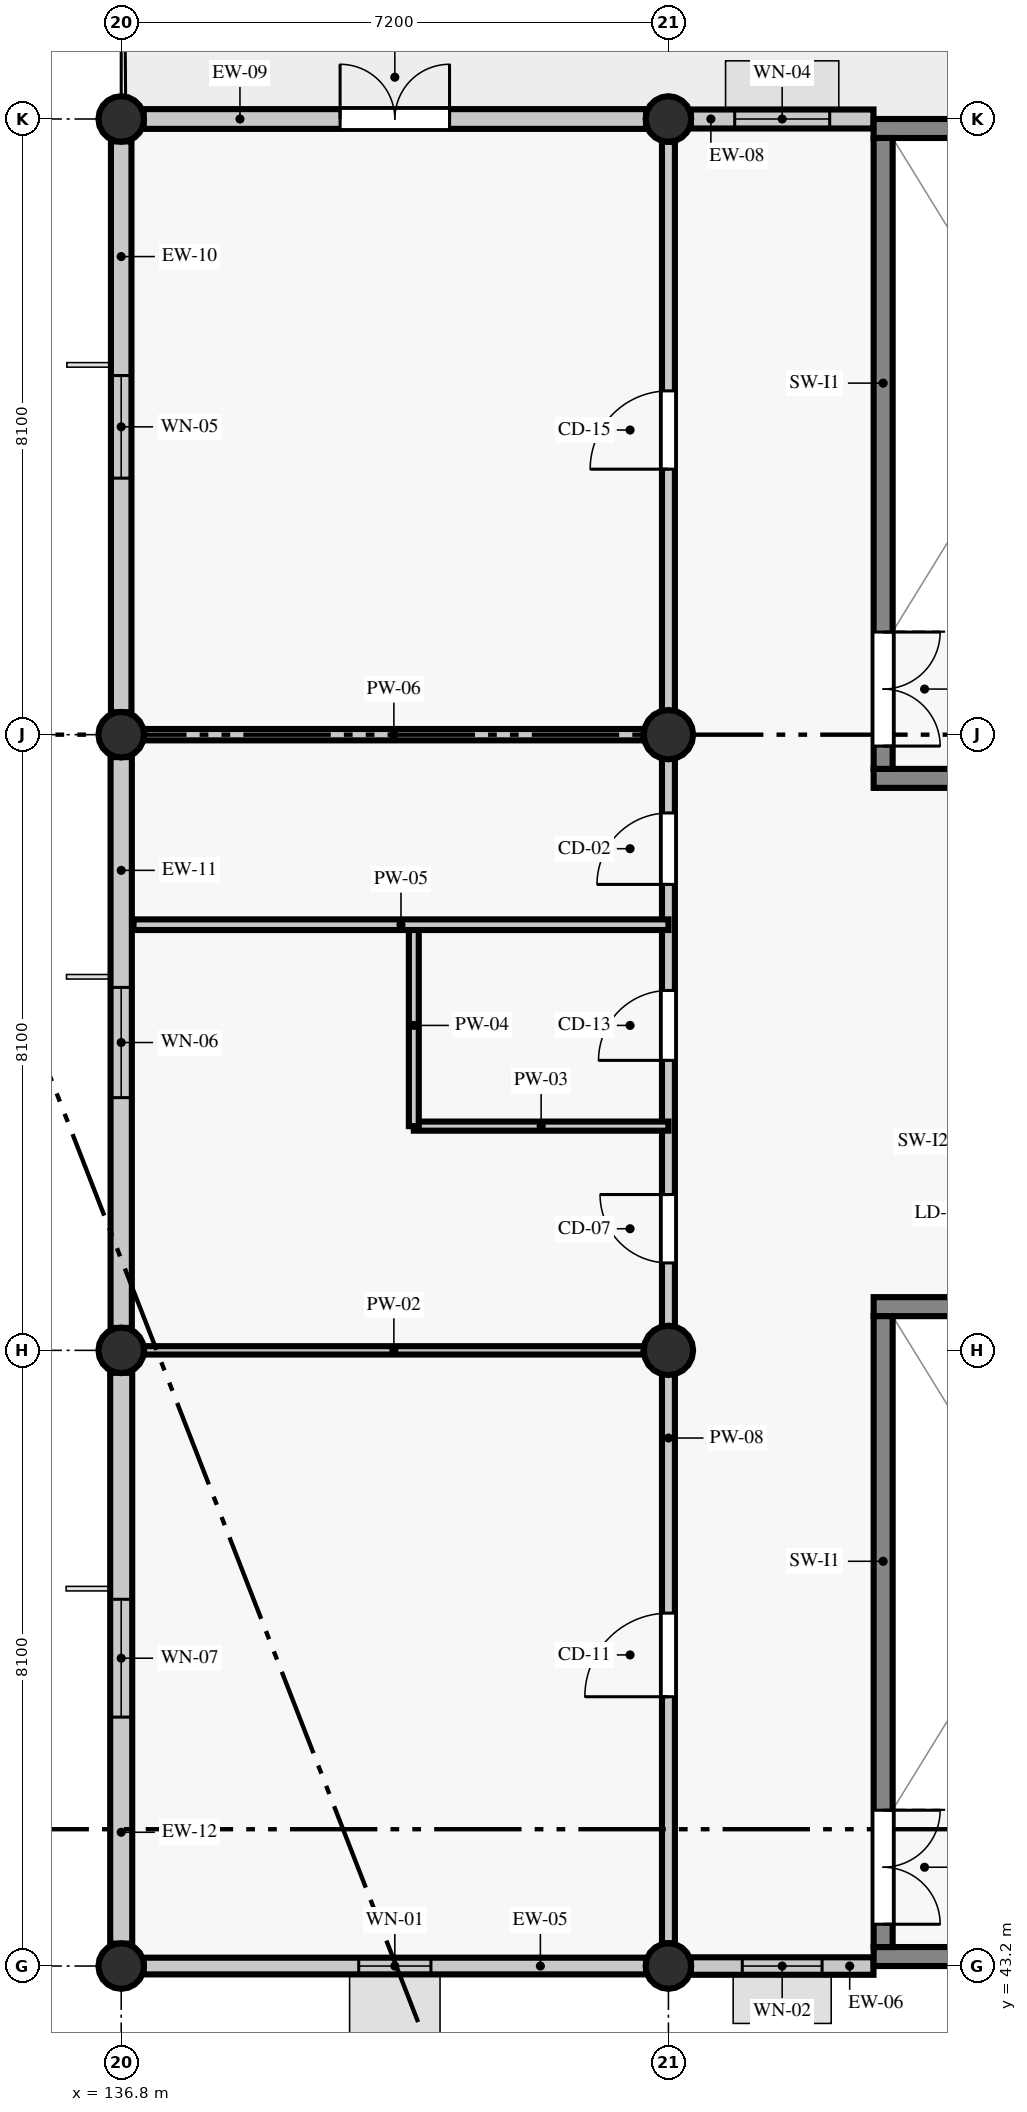
"""IFC4 building model, lengths in metres.
Left out: names, types, materials, properties, quantities, classifications, styles, units other than length and angle.
Written with IfcOpenShell. Run it as: python <this file> out.ifc"""

import sys

from ifc_helpers import new_model, si_unit, direction, frame, frame_2d, origin, origin_2d, place, context, subcontext, project, spatial, rectangle, circle, extrude, element, fill, save


model = new_model("IFC4")
c1 = context("Model", 3, precision=1e-05, world=origin(), true_north=direction((0.0, 1.0)))
c2 = subcontext(c1, "Body", "Model", "MODEL_VIEW")
j1 = project(units=[si_unit("LENGTHUNIT", "METRE"), si_unit("PLANEANGLEUNIT", "RADIAN")], contexts=[c1])
p1 = place(None, origin())
s1 = spatial("IfcSite", under=j1, at=p1, CompositionType="ELEMENT")
p2 = place(p1, origin())
s2 = spatial("IfcBuilding", under=s1, at=p2, CompositionType="ELEMENT")
p3 = place(p2, frame((0.0, 0.0, 9.6)))
s3 = spatial("IfcBuildingStorey", under=s2, at=p3, CompositionType="ELEMENT", Elevation=9.6)
for number, where, z_axis, x_axis in (
    (1, (136.8, 43.2, 0.0), (0.0, 0.0, 1.0), (1.0, 0.0, 0.0)),
    (2, (136.8, 51.3, 0.0), (0.0, 0.0, 1.0), (1.0, 0.0, 0.0)),
    (3, (136.8, 59.4, 0.0), (0.0, 0.0, 1.0), (1.0, 0.0, 0.0)),
    (4, (136.8, 67.5, 0.0), (0.0, 0.0, 1.0), (1.0, 0.0, 0.0)),
    (5, (144.0, 43.2, 0.0), (0.0, 0.0, 1.0), (1.0, 0.0, 0.0)),
):
    element("IfcColumn", number, at=place(p3, frame(where, z_axis=z_axis, x_axis=x_axis)), inside=s3, PredefinedType="COLUMN", context=c2, shape_type="SweptSolid", body=[
        extrude(circle(Radius=0.3, at=origin_2d()), origin(), (0.0, 0.0, 1.0), 4.2),
    ])
for number, where, z_axis, x_axis in (
    (6, (144.0, 51.3, 0.0), (0.0, 0.0, 1.0), (1.0, 0.0, 0.0)),
    (7, (144.0, 59.4, 0.0), (0.0, 0.0, 1.0), (1.0, 0.0, 0.0)),
):
    element("IfcColumn", number, at=place(p3, frame(where, z_axis=z_axis, x_axis=x_axis)), inside=s3, PredefinedType="COLUMN", context=c2, shape_type="SweptSolid", body=[
        extrude(circle(Radius=0.325, at=origin_2d()), origin(), (0.0, 0.0, 1.0), 4.2),
    ])
p4 = place(p3, frame((144.0, 67.5, 0.0), z_axis=(0.0, 0.0, 1.0), x_axis=(1.0, 0.0, 0.0)))
e8 = element("IfcColumn", 8, at=p4, inside=s3, PredefinedType="COLUMN", context=c2, shape_type="SweptSolid", body=[
    extrude(circle(Radius=0.3, at=origin_2d()), origin(), (0.0, 0.0, 1.0), 4.2),
])
p5 = place(p3, frame((137.095, 43.2, 0.0), z_axis=(0.0, 0.0, 1.0), x_axis=(1.0, 0.0, 0.0)))
e9 = element("IfcWall", 9, at=p5, inside=s3, PredefinedType="STANDARD", context=c2, shape_type="SweptSolid", body=[
    extrude(rectangle(XDim=6.61, YDim=0.22, at=frame_2d((3.305, 0.0))), origin(), (0.0, 0.0, 1.0), 3.55),
])
p6 = place(p5, frame((2.83, 0.0, 0.9)))
e10 = element("IfcOpeningElement", 10, at=p6, cuts=e9, PredefinedType="OPENING", context=c2, shape_type="SweptSolid", body=[
    extrude(rectangle(XDim=0.95, YDim=1.3, at=frame_2d((0.475, 0.65))), frame((0.0, 0.12, 0.0), z_axis=(0.0, -1.0, 0.0), x_axis=(1.0, 0.0, 0.0)), (0.0, 0.0, 1.0), 0.24),
])
p7 = place(p3, frame((144.295, 43.2, 0.0), z_axis=(0.0, 0.0, 1.0), x_axis=(1.0, 0.0, 0.0)))
e11 = element("IfcWall", 11, at=p7, inside=s3, PredefinedType="STANDARD", context=c2, shape_type="SweptSolid", body=[
    extrude(rectangle(XDim=2.403, YDim=0.23, at=frame_2d((1.202, 0.0))), origin(), (0.0, 0.0, 1.0), 4.2),
])
p8 = place(p7, frame((0.677, 0.0, 0.9)))
e12 = element("IfcOpeningElement", 12, at=p8, cuts=e11, PredefinedType="OPENING", context=c2, shape_type="SweptSolid", body=[
    extrude(rectangle(XDim=1.05, YDim=1.3, at=frame_2d((0.525, 0.65))), frame((0.0, 0.125, 0.0), z_axis=(0.0, -1.0, 0.0), x_axis=(1.0, 0.0, 0.0)), (0.0, 0.0, 1.0), 0.25),
])
p9 = place(p3, frame((146.698, 67.5, 0.0), z_axis=(0.0, 0.0, 1.0), x_axis=(-1.0, 0.0, 0.0)))
e13 = element("IfcWall", 13, at=p9, inside=s3, PredefinedType="STANDARD", context=c2, shape_type="SweptSolid", body=[
    extrude(rectangle(XDim=2.403, YDim=0.25, at=frame_2d((1.202, 0.0))), origin(), (0.0, 0.0, 1.0), 4.2),
])
p10 = place(p9, frame((0.576, 0.0, 0.9)))
e14 = element("IfcOpeningElement", 14, at=p10, cuts=e13, PredefinedType="OPENING", context=c2, shape_type="SweptSolid", body=[
    extrude(rectangle(XDim=1.25, YDim=1.3, at=frame_2d((0.625, 0.65))), frame((0.0, 0.135, 0.0), z_axis=(0.0, -1.0, 0.0), x_axis=(1.0, 0.0, 0.0)), (0.0, 0.0, 1.0), 0.27),
])
p11 = place(p3, frame((143.705, 67.5, 0.0), z_axis=(0.0, 0.0, 1.0), x_axis=(-1.0, 0.0, 0.0)))
e15 = element("IfcWall", 15, at=p11, inside=s3, PredefinedType="STANDARD", context=c2, shape_type="SweptSolid", body=[
    extrude(rectangle(XDim=6.61, YDim=0.26, at=frame_2d((3.305, 0.0))), origin(), (0.0, 0.0, 1.0), 3.55),
])
p12 = place(p11, frame((2.585, 0.0, 0.0)))
e16 = element("IfcOpeningElement", 16, at=p12, cuts=e15, PredefinedType="OPENING", context=c2, shape_type="SweptSolid", body=[
    extrude(rectangle(XDim=1.44, YDim=2.16, at=frame_2d((0.72, 1.08))), frame((0.0, 0.14, 0.0), z_axis=(0.0, -1.0, 0.0), x_axis=(1.0, 0.0, 0.0)), (0.0, 0.0, 1.0), 0.28),
])
p13 = place(p3, frame((136.8, 67.205, 0.0), z_axis=(0.0, 0.0, 1.0), x_axis=(0.0, -1.0, 0.0)))
e17 = element("IfcWall", 17, at=p13, inside=s3, PredefinedType="STANDARD", context=c2, shape_type="SweptSolid", body=[
    extrude(rectangle(XDim=7.51, YDim=0.27, at=frame_2d((3.755, 0.0))), origin(), (0.0, 0.0, 1.0), 3.55),
])
p14 = place(p13, frame((3.08, 0.0, 0.9)))
e18 = element("IfcOpeningElement", 18, at=p14, cuts=e17, PredefinedType="OPENING", context=c2, shape_type="SweptSolid", body=[
    extrude(rectangle(XDim=1.35, YDim=1.3, at=frame_2d((0.675, 0.65))), frame((0.0, 0.145, 0.0), z_axis=(0.0, -1.0, 0.0), x_axis=(1.0, 0.0, 0.0)), (0.0, 0.0, 1.0), 0.29),
])
p15 = place(p3, frame((136.8, 59.105, 0.0), z_axis=(0.0, 0.0, 1.0), x_axis=(0.0, -1.0, 0.0)))
e19 = element("IfcWall", 19, at=p15, inside=s3, PredefinedType="STANDARD", context=c2, shape_type="SweptSolid", body=[
    extrude(rectangle(XDim=7.51, YDim=0.28, at=frame_2d((3.755, 0.0))), origin(), (0.0, 0.0, 1.0), 3.55),
])
p16 = place(p15, frame((3.03, 0.0, 0.9)))
e20 = element("IfcOpeningElement", 20, at=p16, cuts=e19, PredefinedType="OPENING", context=c2, shape_type="SweptSolid", body=[
    extrude(rectangle(XDim=1.45, YDim=1.3, at=frame_2d((0.725, 0.65))), frame((0.0, 0.15, 0.0), z_axis=(0.0, -1.0, 0.0), x_axis=(1.0, 0.0, 0.0)), (0.0, 0.0, 1.0), 0.3),
])
p17 = place(p3, frame((136.8, 51.005, 0.0), z_axis=(0.0, 0.0, 1.0), x_axis=(0.0, -1.0, 0.0)))
e21 = element("IfcWall", 21, at=p17, inside=s3, PredefinedType="STANDARD", context=c2, shape_type="SweptSolid", body=[
    extrude(rectangle(XDim=7.51, YDim=0.29, at=frame_2d((3.755, 0.0))), origin(), (0.0, 0.0, 1.0), 3.55),
])
p18 = place(p17, frame((2.98, 0.0, 0.9)))
e22 = element("IfcOpeningElement", 22, at=p18, cuts=e21, PredefinedType="OPENING", context=c2, shape_type="SweptSolid", body=[
    extrude(rectangle(XDim=1.55, YDim=1.3, at=frame_2d((0.775, 0.65))), frame((0.0, 0.155, 0.0), z_axis=(0.0, -1.0, 0.0), x_axis=(1.0, 0.0, 0.0)), (0.0, 0.0, 1.0), 0.31),
])
for number, where, z_axis, x_axis in (
    (23, (146.7, 43.325, 0.0), (0.0, 0.0, 1.0), (1.0, 0.0, 0.0)),
    (24, (151.2, 51.875, 0.0), (0.0, 0.0, 1.0), (-1.0, 0.0, 0.0)),
):
    element("IfcWall", number, at=place(p3, frame(where, z_axis=z_axis, x_axis=x_axis)), inside=s3, PredefinedType="SHEAR", context=c2, shape_type="SweptSolid", body=[
        extrude(rectangle(XDim=4.5, YDim=0.25, at=frame_2d((2.25, 0.0))), origin(), (0.0, 0.0, 1.0), 4.2),
    ])
p19 = place(p3, frame((146.825, 51.75, 0.0), z_axis=(0.0, 0.0, 1.0), x_axis=(0.0, -1.0, 0.0)))
e25 = element("IfcWall", 25, at=p19, inside=s3, PredefinedType="SHEAR", context=c2, shape_type="SweptSolid", body=[
    extrude(rectangle(XDim=8.3, YDim=0.25, at=frame_2d((4.15, 0.0))), origin(), (0.0, 0.0, 1.0), 4.2),
])
p20 = place(p19, frame((6.5, 0.0, 0.0)))
e26 = element("IfcOpeningElement", 26, at=p20, cuts=e25, PredefinedType="OPENING", context=c2, shape_type="SweptSolid", body=[
    extrude(rectangle(XDim=1.5, YDim=2.15, at=frame_2d((0.75, 1.075))), frame((0.0, 0.135, 0.0), z_axis=(0.0, -1.0, 0.0), x_axis=(1.0, 0.0, 0.0)), (0.0, 0.0, 1.0), 0.27),
])
for number, where, z_axis, x_axis in (
    (27, (146.7, 58.825, 0.0), (0.0, 0.0, 1.0), (1.0, 0.0, 0.0)),
    (28, (151.2, 67.375, 0.0), (0.0, 0.0, 1.0), (-1.0, 0.0, 0.0)),
):
    element("IfcWall", number, at=place(p3, frame(where, z_axis=z_axis, x_axis=x_axis)), inside=s3, PredefinedType="SHEAR", context=c2, shape_type="SweptSolid", body=[
        extrude(rectangle(XDim=4.5, YDim=0.25, at=frame_2d((2.25, 0.0))), origin(), (0.0, 0.0, 1.0), 4.2),
    ])
p21 = place(p3, frame((146.825, 67.25, 0.0), z_axis=(0.0, 0.0, 1.0), x_axis=(0.0, -1.0, 0.0)))
e29 = element("IfcWall", 29, at=p21, inside=s3, PredefinedType="SHEAR", context=c2, shape_type="SweptSolid", body=[
    extrude(rectangle(XDim=8.3, YDim=0.25, at=frame_2d((4.15, 0.0))), origin(), (0.0, 0.0, 1.0), 4.2),
])
p22 = place(p21, frame((6.5, 0.0, 0.0)))
e30 = element("IfcOpeningElement", 30, at=p22, cuts=e29, PredefinedType="OPENING", context=c2, shape_type="SweptSolid", body=[
    extrude(rectangle(XDim=1.5, YDim=2.15, at=frame_2d((0.75, 1.075))), frame((0.0, 0.135, 0.0), z_axis=(0.0, -1.0, 0.0), x_axis=(1.0, 0.0, 0.0)), (0.0, 0.0, 1.0), 0.27),
])
p23 = place(p3, frame((144.0, 43.5, 0.0), z_axis=(0.0, 0.0, 1.0), x_axis=(0.0, 1.0, 0.0)))
e31 = element("IfcWall", 31, at=p23, inside=s3, PredefinedType="PARTITIONING", context=c2, shape_type="SweptSolid", body=[
    extrude(rectangle(XDim=23.7, YDim=0.17, at=frame_2d((11.85, 0.0))), origin(), (0.0, 0.0, 1.0), 3.75),
])
p24 = place(p23, frame((3.243, 0.0, 0.0)))
e32 = element("IfcOpeningElement", 32, at=p24, cuts=e31, PredefinedType="OPENING", context=c2, shape_type="SweptSolid", body=[
    extrude(rectangle(XDim=1.1, YDim=2.13, at=frame_2d((0.55, 1.065))), frame((0.0, 0.095, 0.0), z_axis=(0.0, -1.0, 0.0), x_axis=(1.0, 0.0, 0.0)), (0.0, 0.0, 1.0), 0.19),
])
p25 = place(p23, frame((8.95, 0.0, 0.0)))
e33 = element("IfcOpeningElement", 33, at=p25, cuts=e31, PredefinedType="OPENING", context=c2, shape_type="SweptSolid", body=[
    extrude(rectangle(XDim=0.9, YDim=2.13, at=frame_2d((0.45, 1.065))), frame((0.0, 0.095, 0.0), z_axis=(0.0, -1.0, 0.0), x_axis=(1.0, 0.0, 0.0)), (0.0, 0.0, 1.0), 0.19),
])
p26 = place(p23, frame((11.615, 0.0, 0.0)))
e34 = element("IfcOpeningElement", 34, at=p26, cuts=e31, PredefinedType="OPENING", context=c2, shape_type="SweptSolid", body=[
    extrude(rectangle(XDim=0.92, YDim=2.18, at=frame_2d((0.46, 1.09))), frame((0.0, 0.095, 0.0), z_axis=(0.0, -1.0, 0.0), x_axis=(1.0, 0.0, 0.0)), (0.0, 0.0, 1.0), 0.19),
])
p27 = place(p23, frame((13.93, 0.0, 0.0)))
e35 = element("IfcOpeningElement", 35, at=p27, cuts=e31, PredefinedType="OPENING", context=c2, shape_type="SweptSolid", body=[
    extrude(rectangle(XDim=0.94, YDim=2.08, at=frame_2d((0.47, 1.04))), frame((0.0, 0.095, 0.0), z_axis=(0.0, -1.0, 0.0), x_axis=(1.0, 0.0, 0.0)), (0.0, 0.0, 1.0), 0.19),
])
p28 = place(p23, frame((19.393, 0.0, 0.0)))
e36 = element("IfcOpeningElement", 36, at=p28, cuts=e31, PredefinedType="OPENING", context=c2, shape_type="SweptSolid", body=[
    extrude(rectangle(XDim=1.03, YDim=2.18, at=frame_2d((0.515, 1.09))), frame((0.0, 0.095, 0.0), z_axis=(0.0, -1.0, 0.0), x_axis=(1.0, 0.0, 0.0)), (0.0, 0.0, 1.0), 0.19),
])
p29 = place(p3, frame((137.1, 51.3, 0.0), z_axis=(0.0, 0.0, 1.0), x_axis=(1.0, 0.0, 0.0)))
e37 = element("IfcWall", 37, at=p29, inside=s3, PredefinedType="PARTITIONING", context=c2, shape_type="SweptSolid", body=[
    extrude(rectangle(XDim=6.575, YDim=0.11, at=frame_2d((3.288, 0.0))), origin(), (0.0, 0.0, 1.0), 3.5),
])
p30 = place(p3, frame((140.65, 54.25, 0.0), z_axis=(0.0, 0.0, 1.0), x_axis=(1.0, 0.0, 0.0)))
e38 = element("IfcWall", 38, at=p30, inside=s3, PredefinedType="PARTITIONING", context=c2, shape_type="SweptSolid", body=[
    extrude(rectangle(XDim=3.35, YDim=0.12, at=frame_2d((1.675, 0.0))), origin(), (0.0, 0.0, 1.0), 4.2),
])
p31 = place(p3, frame((140.65, 54.25, 0.0), z_axis=(0.0, 0.0, 1.0), x_axis=(0.0, 1.0, 0.0)))
e39 = element("IfcWall", 39, at=p31, inside=s3, PredefinedType="PARTITIONING", context=c2, shape_type="SweptSolid", body=[
    extrude(rectangle(XDim=2.65, YDim=0.13, at=frame_2d((1.325, 0.0))), origin(), (0.0, 0.0, 1.0), 3.84),
])
p32 = place(p3, frame((136.962, 56.9, 0.0), z_axis=(0.0, 0.0, 1.0), x_axis=(1.0, 0.0, 0.0)))
e40 = element("IfcWall", 40, at=p32, inside=s3, PredefinedType="PARTITIONING", context=c2, shape_type="SweptSolid", body=[
    extrude(rectangle(XDim=7.038, YDim=0.14, at=frame_2d((3.519, 0.0))), origin(), (0.0, 0.0, 1.0), 4.2),
])
p33 = place(p3, frame((137.1, 59.4, 0.0), z_axis=(0.0, 0.0, 1.0), x_axis=(1.0, 0.0, 0.0)))
e41 = element("IfcWall", 41, at=p33, inside=s3, PredefinedType="PARTITIONING", context=c2, shape_type="SweptSolid", body=[
    extrude(rectangle(XDim=6.575, YDim=0.15, at=frame_2d((3.288, 0.0))), origin(), (0.0, 0.0, 1.0), 3.5),
])
p34 = place(p6, origin())
e42 = element("IfcWindow", 42, at=p34, inside=s3, PartitioningType="SINGLE_PANEL", PredefinedType="WINDOW", context=c2, shape_type="SweptSolid", body=[
    extrude(rectangle(XDim=0.95, YDim=1.3, at=frame_2d((0.475, 0.65))), frame((0.0, 0.03, 0.0), z_axis=(0.0, -1.0, 0.0), x_axis=(1.0, 0.0, 0.0)), (0.0, 0.0, 1.0), 0.06),
])
fill(e10, e42)
p35 = place(p8, origin())
e43 = element("IfcWindow", 43, at=p35, inside=s3, PartitioningType="SINGLE_PANEL", PredefinedType="WINDOW", context=c2, shape_type="SweptSolid", body=[
    extrude(rectangle(XDim=1.05, YDim=1.3, at=frame_2d((0.525, 0.65))), frame((0.0, 0.03, 0.0), z_axis=(0.0, -1.0, 0.0), x_axis=(1.0, 0.0, 0.0)), (0.0, 0.0, 1.0), 0.06),
])
fill(e12, e43)
p36 = place(p10, origin())
e44 = element("IfcWindow", 44, at=p36, inside=s3, PartitioningType="SINGLE_PANEL", PredefinedType="WINDOW", context=c2, shape_type="SweptSolid", body=[
    extrude(rectangle(XDim=1.25, YDim=1.3, at=frame_2d((0.625, 0.65))), frame((0.0, 0.03, 0.0), z_axis=(0.0, -1.0, 0.0), x_axis=(1.0, 0.0, 0.0)), (0.0, 0.0, 1.0), 0.06),
])
fill(e14, e44)
p37 = place(p12, frame((1.44, 0.0, 0.0), z_axis=(0.0, 0.0, 1.0), x_axis=(-1.0, 0.0, 0.0)))
e45 = element("IfcDoor", 45, at=p37, inside=s3, OperationType="DOUBLE_DOOR_SINGLE_SWING", PredefinedType="DOOR", context=c2, shape_type="SweptSolid", body=[
    extrude(rectangle(XDim=1.44, YDim=2.16, at=frame_2d((0.72, 1.08))), frame((0.0, 0.025, 0.0), z_axis=(0.0, -1.0, 0.0), x_axis=(1.0, 0.0, 0.0)), (0.0, 0.0, 1.0), 0.05),
])
fill(e16, e45)
p38 = place(p14, origin())
e46 = element("IfcWindow", 46, at=p38, inside=s3, PartitioningType="SINGLE_PANEL", PredefinedType="WINDOW", context=c2, shape_type="SweptSolid", body=[
    extrude(rectangle(XDim=1.35, YDim=1.3, at=frame_2d((0.675, 0.65))), frame((0.0, 0.03, 0.0), z_axis=(0.0, -1.0, 0.0), x_axis=(1.0, 0.0, 0.0)), (0.0, 0.0, 1.0), 0.06),
])
fill(e18, e46)
p39 = place(p16, origin())
e47 = element("IfcWindow", 47, at=p39, inside=s3, PartitioningType="SINGLE_PANEL", PredefinedType="WINDOW", context=c2, shape_type="SweptSolid", body=[
    extrude(rectangle(XDim=1.45, YDim=1.3, at=frame_2d((0.725, 0.65))), frame((0.0, 0.03, 0.0), z_axis=(0.0, -1.0, 0.0), x_axis=(1.0, 0.0, 0.0)), (0.0, 0.0, 1.0), 0.06),
])
fill(e20, e47)
p40 = place(p18, origin())
e48 = element("IfcWindow", 48, at=p40, inside=s3, PartitioningType="SINGLE_PANEL", PredefinedType="WINDOW", context=c2, shape_type="SweptSolid", body=[
    extrude(rectangle(XDim=1.55, YDim=1.3, at=frame_2d((0.775, 0.65))), frame((0.0, 0.03, 0.0), z_axis=(0.0, -1.0, 0.0), x_axis=(1.0, 0.0, 0.0)), (0.0, 0.0, 1.0), 0.06),
])
fill(e22, e48)
p41 = place(p20, origin())
e49 = element("IfcDoor", 49, at=p41, inside=s3, OperationType="DOUBLE_DOOR_SINGLE_SWING", PredefinedType="DOOR", context=c2, shape_type="SweptSolid", body=[
    extrude(rectangle(XDim=1.5, YDim=2.15, at=frame_2d((0.75, 1.075))), frame((0.0, 0.025, 0.0), z_axis=(0.0, -1.0, 0.0), x_axis=(1.0, 0.0, 0.0)), (0.0, 0.0, 1.0), 0.05),
])
fill(e26, e49)
p42 = place(p22, origin())
e50 = element("IfcDoor", 50, at=p42, inside=s3, OperationType="DOUBLE_DOOR_SINGLE_SWING", PredefinedType="DOOR", context=c2, shape_type="SweptSolid", body=[
    extrude(rectangle(XDim=1.5, YDim=2.15, at=frame_2d((0.75, 1.075))), frame((0.0, 0.025, 0.0), z_axis=(0.0, -1.0, 0.0), x_axis=(1.0, 0.0, 0.0)), (0.0, 0.0, 1.0), 0.05),
])
fill(e30, e50)
p43 = place(p24, origin())
e51 = element("IfcDoor", 51, at=p43, inside=s3, OperationType="SINGLE_SWING_LEFT", PredefinedType="DOOR", context=c2, shape_type="SweptSolid", body=[
    extrude(rectangle(XDim=1.1, YDim=2.13, at=frame_2d((0.55, 1.065))), frame((0.0, 0.025, 0.0), z_axis=(0.0, -1.0, 0.0), x_axis=(1.0, 0.0, 0.0)), (0.0, 0.0, 1.0), 0.05),
])
fill(e32, e51)
p44 = place(p25, origin())
e52 = element("IfcDoor", 52, at=p44, inside=s3, OperationType="SINGLE_SWING_RIGHT", PredefinedType="DOOR", context=c2, shape_type="SweptSolid", body=[
    extrude(rectangle(XDim=0.9, YDim=2.13, at=frame_2d((0.45, 1.065))), frame((0.0, 0.025, 0.0), z_axis=(0.0, -1.0, 0.0), x_axis=(1.0, 0.0, 0.0)), (0.0, 0.0, 1.0), 0.05),
])
fill(e33, e52)
p45 = place(p26, origin())
e53 = element("IfcDoor", 53, at=p45, inside=s3, OperationType="SINGLE_SWING_LEFT", PredefinedType="DOOR", context=c2, shape_type="SweptSolid", body=[
    extrude(rectangle(XDim=0.92, YDim=2.18, at=frame_2d((0.46, 1.09))), frame((0.0, 0.025, 0.0), z_axis=(0.0, -1.0, 0.0), x_axis=(1.0, 0.0, 0.0)), (0.0, 0.0, 1.0), 0.05),
])
fill(e34, e53)
p46 = place(p27, origin())
e54 = element("IfcDoor", 54, at=p46, inside=s3, OperationType="SINGLE_SWING_LEFT", PredefinedType="DOOR", context=c2, shape_type="SweptSolid", body=[
    extrude(rectangle(XDim=0.94, YDim=2.08, at=frame_2d((0.47, 1.04))), frame((0.0, 0.025, 0.0), z_axis=(0.0, -1.0, 0.0), x_axis=(1.0, 0.0, 0.0)), (0.0, 0.0, 1.0), 0.05),
])
fill(e35, e54)
p47 = place(p28, origin())
e55 = element("IfcDoor", 55, at=p47, inside=s3, OperationType="SINGLE_SWING_LEFT", PredefinedType="DOOR", context=c2, shape_type="SweptSolid", body=[
    extrude(rectangle(XDim=1.03, YDim=2.18, at=frame_2d((0.515, 1.09))), frame((0.0, 0.025, 0.0), z_axis=(0.0, -1.0, 0.0), x_axis=(1.0, 0.0, 0.0)), (0.0, 0.0, 1.0), 0.05),
])
fill(e36, e55)
save(model, sys.argv[1])
